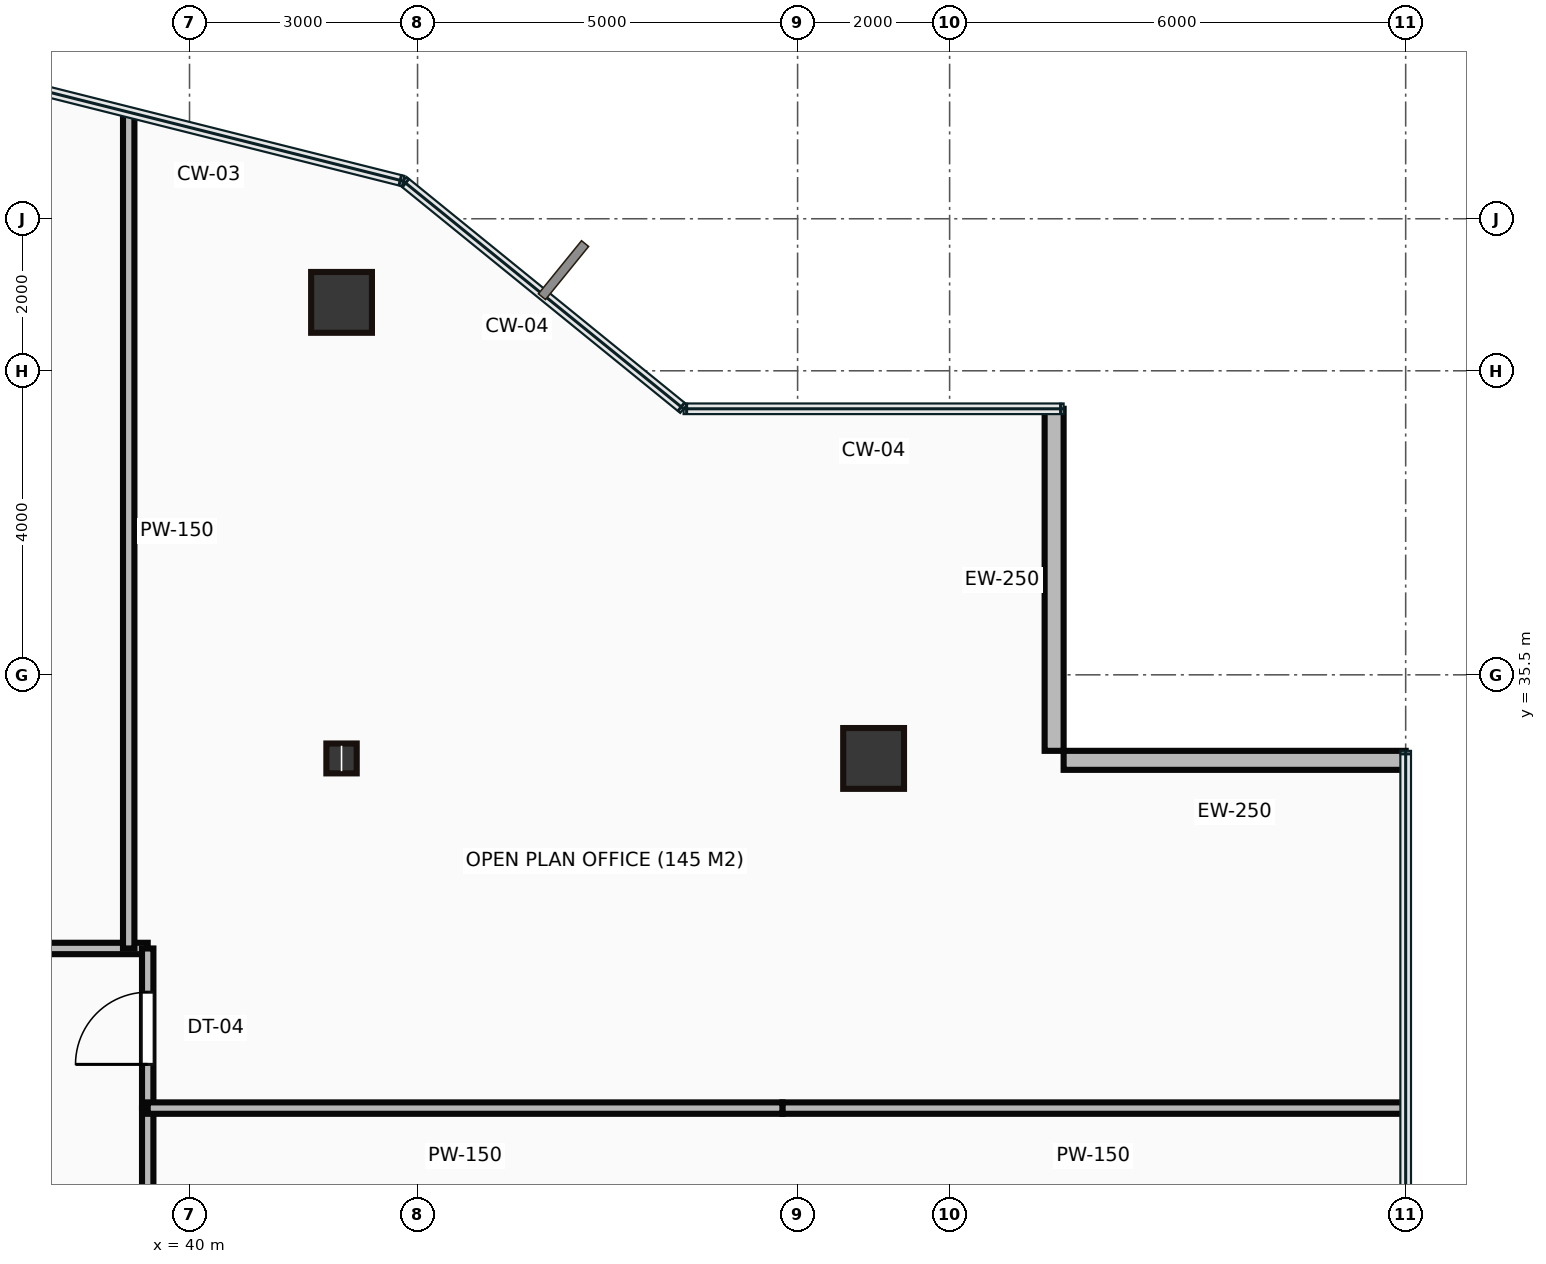
"""IFC4 building model, lengths in metres.
Left out: names, types, materials, properties, quantities, classifications, styles, units other than length and angle.
Written with IfcOpenShell. Run it as: python <this file> out.ifc"""

import sys

from ifc_helpers import new_model, si_unit, direction, frame, frame_2d, origin, origin_2d, place, context, subcontext, project, spatial, rectangle, hollow_rectangle, i_section, extrude, source, transform, mapped, element, fill, save


model = new_model("IFC4")
c1 = context("Model", 3, precision=1e-05, world=origin(), true_north=direction((0.0, 1.0)))
c2 = subcontext(c1, "Body", "Model", "MODEL_VIEW")
j1 = project(units=[si_unit("LENGTHUNIT", "METRE"), si_unit("PLANEANGLEUNIT", "RADIAN")], contexts=[c1])
p1 = place(None, origin())
s1 = spatial("IfcSite", under=j1, at=p1, CompositionType="ELEMENT")
p2 = place(p1, origin())
s2 = spatial("IfcBuilding", under=s1, at=p2, CompositionType="ELEMENT")
p3 = place(p2, frame((0.0, 0.0, 103.25)))
s3 = spatial("IfcBuildingStorey", under=s2, at=p3, CompositionType="ELEMENT", Elevation=103.25)
m1 = source(origin(), c2, "Body", "SweptSolid", [
    extrude(i_section(OverallWidth=0.399, OverallDepth=0.393, WebThickness=0.023, FlangeThickness=0.037, at=origin_2d()), origin(), (0.0, 0.0, 1.0), 3.65),
])
p4 = place(p3, frame((42.0, 34.4, 0.0), z_axis=(0.0, 0.0, 1.0), x_axis=(1.0, 0.0, 0.0)))
e1 = element("IfcColumn", 1, at=p4, inside=s3, PredefinedType="COLUMN", context=c2, shape_type="MappedRepresentation", body=[
    mapped(m1, transform((0.0, 0.0, 0.0))),
])
m2 = source(origin(), c2, "Body", "SweptSolid", [
    extrude(hollow_rectangle(XDim=0.8, YDim=0.8, WallThickness=0.04, at=origin_2d()), origin(), (0.0, 0.0, 1.0), 3.65),
])
for number, where, z_axis, x_axis in (
    (2, (42.0, 40.4, 0.0), (0.0, 0.0, 1.0), (1.0, 0.0, 0.0)),
    (3, (49.0, 34.4, 0.0), (0.0, 0.0, 1.0), (1.0, 0.0, 0.0)),
):
    element("IfcColumn", number, at=place(p3, frame(where, z_axis=z_axis, x_axis=x_axis)), inside=s3, PredefinedType="COLUMN", context=c2, shape_type="MappedRepresentation", body=[
        mapped(m2, transform((0.0, 0.0, 0.0))),
    ])
m3 = source(origin(), c2, "Body", "SweptSolid", [
    extrude(rectangle(XDim=4.5, YDim=0.25, at=frame_2d((2.25, 0.0))), origin(), (0.0, 0.0, 1.0), 3.4),
])
for number, where, z_axis, x_axis in (
    (4, (56.0, 34.375, 0.0), (0.0, 0.0, 1.0), (-1.0, 0.0, 0.0)),
    (5, (51.375, 34.5, 0.0), (0.0, 0.0, 1.0), (0.0, 1.0, 0.0)),
):
    element("IfcWall", number, at=place(p3, frame(where, z_axis=z_axis, x_axis=x_axis)), inside=s3, PredefinedType="STANDARD", context=c2, shape_type="MappedRepresentation", body=[
        mapped(m3, transform((0.0, 0.0, 0.0))),
    ])
m4 = source(origin(), c2, "Body", "SweptSolid", [
    extrude(rectangle(XDim=34.85, YDim=0.15, at=frame_2d((17.425, 0.0))), origin(), (0.0, 0.0, 1.0), 3.4),
])
p5 = place(p3, frame((4.6, 31.9, 0.0), z_axis=(0.0, 0.0, 1.0), x_axis=(1.0, 0.0, 0.0)))
e6 = element("IfcWall", 6, at=p5, inside=s3, PredefinedType="PARTITIONING", context=c2, shape_type="MappedRepresentation", body=[
    mapped(m4, transform((0.0, 0.0, 0.0))),
])
p6 = place(p5, frame((2.255, 0.0, 0.0)))
e7 = element("IfcOpeningElement", 7, at=p6, cuts=e6, PredefinedType="OPENING", context=c2, shape_type="SweptSolid", body=[
    extrude(rectangle(XDim=0.95, YDim=2.15, at=frame_2d((0.475, 1.075))), frame((0.0, 0.085, 0.0), z_axis=(0.0, -1.0, 0.0), x_axis=(1.0, 0.0, 0.0)), (0.0, 0.0, 1.0), 0.17),
])
p7 = place(p5, frame((9.625, 0.0, 0.0)))
e8 = element("IfcOpeningElement", 8, at=p7, cuts=e6, PredefinedType="OPENING", context=c2, shape_type="SweptSolid", body=[
    extrude(rectangle(XDim=0.95, YDim=2.15, at=frame_2d((0.475, 1.075))), frame((0.0, 0.085, 0.0), z_axis=(0.0, -1.0, 0.0), x_axis=(1.0, 0.0, 0.0)), (0.0, 0.0, 1.0), 0.17),
])
p8 = place(p5, frame((19.625, 0.0, 0.0)))
e9 = element("IfcOpeningElement", 9, at=p8, cuts=e6, PredefinedType="OPENING", context=c2, shape_type="SweptSolid", body=[
    extrude(rectangle(XDim=0.95, YDim=2.15, at=frame_2d((0.475, 1.075))), frame((0.0, 0.085, 0.0), z_axis=(0.0, -1.0, 0.0), x_axis=(1.0, 0.0, 0.0)), (0.0, 0.0, 1.0), 0.17),
])
p9 = place(p5, frame((29.42, 0.0, 0.0)))
e10 = element("IfcOpeningElement", 10, at=p9, cuts=e6, PredefinedType="OPENING", context=c2, shape_type="SweptSolid", body=[
    extrude(rectangle(XDim=0.95, YDim=2.15, at=frame_2d((0.475, 1.075))), frame((0.0, 0.085, 0.0), z_axis=(0.0, -1.0, 0.0), x_axis=(1.0, 0.0, 0.0)), (0.0, 0.0, 1.0), 0.17),
])
m5 = source(origin(), c2, "Body", "SweptSolid", [
    extrude(rectangle(XDim=2.1, YDim=0.15, at=frame_2d((1.05, 0.0))), origin(), (0.0, 0.0, 1.0), 3.4),
])
p10 = place(p3, frame((39.45, 31.9, 0.0), z_axis=(0.0, 0.0, 1.0), x_axis=(0.0, -1.0, 0.0)))
e11 = element("IfcWall", 11, at=p10, inside=s3, PredefinedType="PARTITIONING", context=c2, shape_type="MappedRepresentation", body=[
    mapped(m5, transform((0.0, 0.0, 0.0))),
])
p11 = place(p10, frame((0.575, 0.0, 0.0)))
e12 = element("IfcOpeningElement", 12, at=p11, cuts=e11, PredefinedType="OPENING", context=c2, shape_type="SweptSolid", body=[
    extrude(rectangle(XDim=0.95, YDim=2.15, at=frame_2d((0.475, 1.075))), frame((0.0, 0.085, 0.0), z_axis=(0.0, -1.0, 0.0), x_axis=(1.0, 0.0, 0.0)), (0.0, 0.0, 1.0), 0.17),
])
m6 = source(origin(), c2, "Body", "SweptSolid", [
    extrude(rectangle(XDim=13.5, YDim=0.15, at=frame_2d((6.75, 0.0))), origin(), (0.0, 0.0, 1.0), 3.4),
])
p12 = place(p3, frame((39.45, 29.8, 0.0), z_axis=(0.0, 0.0, 1.0), x_axis=(0.0, -1.0, 0.0)))
e13 = element("IfcWall", 13, at=p12, inside=s3, PredefinedType="PARTITIONING", context=c2, shape_type="MappedRepresentation", body=[
    mapped(m6, transform((0.0, 0.0, 0.0))),
])
p13 = place(p12, frame((6.275, 0.0, 0.0)))
e14 = element("IfcOpeningElement", 14, at=p13, cuts=e13, PredefinedType="OPENING", context=c2, shape_type="SweptSolid", body=[
    extrude(rectangle(XDim=0.95, YDim=2.15, at=frame_2d((0.475, 1.075))), frame((0.0, 0.085, 0.0), z_axis=(0.0, -1.0, 0.0), x_axis=(1.0, 0.0, 0.0)), (0.0, 0.0, 1.0), 0.17),
])
m7 = source(origin(), c2, "Body", "SweptSolid", [
    extrude(rectangle(XDim=10.982, YDim=0.15, at=frame_2d((5.491, 0.0))), origin(), (0.0, 0.0, 1.0), 3.4),
])
p14 = place(p3, frame((39.2, 42.882, 0.0), z_axis=(0.0, 0.0, 1.0), x_axis=(0.0, -1.0, 0.0)))
e15 = element("IfcWall", 15, at=p14, inside=s3, PredefinedType="PARTITIONING", context=c2, shape_type="MappedRepresentation", body=[
    mapped(m7, transform((0.0, 0.0, 0.0))),
])
m8 = source(origin(), c2, "Body", "SweptSolid", [
    extrude(rectangle(XDim=8.18, YDim=0.15, at=frame_2d((4.09, 0.0))), origin(), (0.0, 0.0, 1.0), 3.4),
])
p15 = place(p3, frame((55.98, 29.8, 0.0), z_axis=(0.0, 0.0, 1.0), x_axis=(-1.0, 0.0, 0.0)))
e16 = element("IfcWall", 16, at=p15, inside=s3, PredefinedType="PARTITIONING", context=c2, shape_type="MappedRepresentation", body=[
    mapped(m8, transform((0.0, 0.0, 0.0))),
])
m9 = source(origin(), c2, "Body", "SweptSolid", [
    extrude(rectangle(XDim=8.35, YDim=0.15, at=frame_2d((4.175, 0.0))), origin(), (0.0, 0.0, 1.0), 3.4),
])
p16 = place(p3, frame((47.8, 29.8, 0.0), z_axis=(0.0, 0.0, 1.0), x_axis=(-1.0, 0.0, 0.0)))
e17 = element("IfcWall", 17, at=p16, inside=s3, PredefinedType="PARTITIONING", context=c2, shape_type="MappedRepresentation", body=[
    mapped(m9, transform((0.0, 0.0, 0.0))),
])
m10 = source(origin(), c2, "Body", "SweptSolid", [
    extrude(rectangle(XDim=0.95, YDim=2.15, at=frame_2d((0.475, 1.075))), frame((0.0, 0.025, 0.0), z_axis=(0.0, -1.0, 0.0), x_axis=(1.0, 0.0, 0.0)), (0.0, 0.0, 1.0), 0.05),
])
p17 = place(p11, origin())
e18 = element("IfcDoor", 18, at=p17, inside=s3, OperationType="SINGLE_SWING_RIGHT", PredefinedType="DOOR", context=c2, shape_type="MappedRepresentation", body=[
    mapped(m10, transform((0.0, 0.0, 0.0))),
])
fill(e12, e18)
save(model, sys.argv[1])
